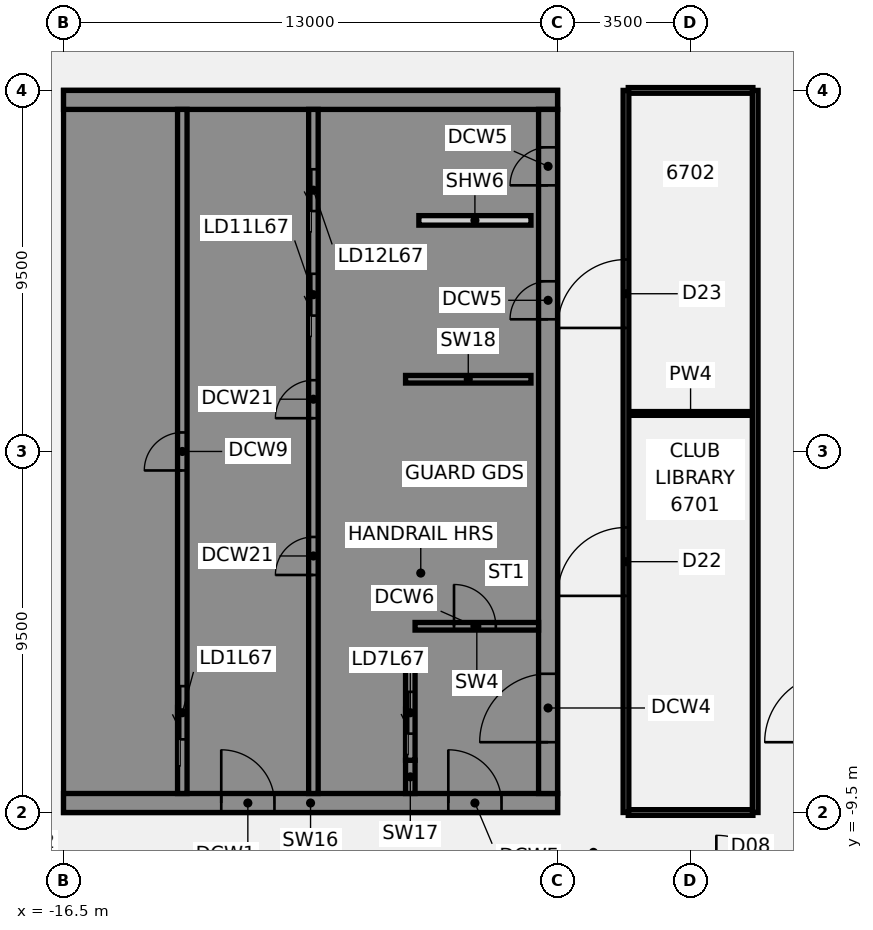
"""IFC4 building model, lengths in metres.
Left out: names, types, materials, properties, quantities, classifications, styles, units other than length and angle.
Written with IfcOpenShell. Run it as: python <this file> out.ifc"""

import sys

from ifc_helpers import new_model, si_unit, direction, frame, frame_2d, origin, place, context, subcontext, project, spatial, polyline, rectangle, outline, extrude, element, fill, save


model = new_model("IFC4")
c1 = context("Model", 3, precision=1e-05, world=origin(), true_north=direction((0.0, 1.0)))
c2 = subcontext(c1, "Body", "Model", "MODEL_VIEW")
j1 = project(units=[si_unit("LENGTHUNIT", "METRE"), si_unit("PLANEANGLEUNIT", "RADIAN")], contexts=[c1])
p1 = place(None, origin())
s1 = spatial("IfcSite", under=j1, at=p1, CompositionType="ELEMENT")
p2 = place(p1, origin())
s2 = spatial("IfcBuilding", under=s1, at=p2, CompositionType="ELEMENT")
p3 = place(p2, frame((0.0, 0.0, 264.0)))
s3 = spatial("IfcBuildingStorey", under=s2, at=p3, CompositionType="ELEMENT", Elevation=264.0)
p4 = place(p3, frame((-1.64, -9.5, 0.0), z_axis=(0.0, 0.0, 1.0), x_axis=(1.0, 0.0, 0.0)))
e1 = element("IfcWall", 1, at=p4, inside=s3, PredefinedType="PARTITIONING", context=c2, shape_type="SweptSolid", body=[
    extrude(rectangle(XDim=3.28, YDim=0.15, at=frame_2d((1.64, 0.0))), origin(), (0.0, 0.0, 1.0), 2.864),
])
p5 = place(p3, frame((-1.64, 1.0, 0.0), z_axis=(0.0, 0.0, 1.0), x_axis=(1.0, 0.0, 0.0)))
e2 = element("IfcWall", 2, at=p5, inside=s3, PredefinedType="PARTITIONING", context=c2, shape_type="SweptSolid", body=[
    extrude(rectangle(XDim=3.28, YDim=0.1, at=frame_2d((1.64, 0.0))), origin(), (0.0, 0.0, 1.0), 2.864),
])
p6 = place(p3, frame((-1.64, 9.5, 0.0), z_axis=(0.0, 0.0, 1.0), x_axis=(1.0, 0.0, 0.0)))
e3 = element("IfcWall", 3, at=p6, inside=s3, PredefinedType="PARTITIONING", context=c2, shape_type="SweptSolid", body=[
    extrude(rectangle(XDim=3.28, YDim=0.15, at=frame_2d((1.64, 0.0))), origin(), (0.0, 0.0, 1.0), 2.864),
])
p7 = place(p3, frame((-1.7, -9.5, 0.0), z_axis=(0.0, 0.0, 1.0), x_axis=(0.0, 1.0, 0.0)))
e4 = element("IfcWall", 4, at=p7, inside=s3, PredefinedType="PARTITIONING", context=c2, shape_type="SweptSolid", body=[
    extrude(rectangle(XDim=19.0, YDim=0.15, at=frame_2d((9.5, 0.0))), origin(), (0.0, 0.0, 1.0), 2.864),
])
p8 = place(p7, frame((5.7, 0.0, 0.0)))
e5 = element("IfcOpeningElement", 5, at=p8, cuts=e4, PredefinedType="OPENING", context=c2, shape_type="SweptSolid", body=[
    extrude(rectangle(XDim=1.8, YDim=2.1, at=frame_2d((0.9, 1.05))), frame((0.0, 0.085, 0.0), z_axis=(0.0, -1.0, 0.0), x_axis=(1.0, 0.0, 0.0)), (0.0, 0.0, 1.0), 0.17),
])
p9 = place(p7, frame((12.75, 0.0, 0.0)))
e6 = element("IfcOpeningElement", 6, at=p9, cuts=e4, PredefinedType="OPENING", context=c2, shape_type="SweptSolid", body=[
    extrude(rectangle(XDim=1.8, YDim=2.1, at=frame_2d((0.9, 1.05))), frame((0.0, 0.085, 0.0), z_axis=(0.0, -1.0, 0.0), x_axis=(1.0, 0.0, 0.0)), (0.0, 0.0, 1.0), 0.17),
])
p10 = place(p3, frame((1.7, -9.5, 0.0), z_axis=(0.0, 0.0, 1.0), x_axis=(0.0, 1.0, 0.0)))
e7 = element("IfcWall", 7, at=p10, inside=s3, PredefinedType="PARTITIONING", context=c2, shape_type="SweptSolid", body=[
    extrude(rectangle(XDim=19.0, YDim=0.15, at=frame_2d((9.5, 0.0))), origin(), (0.0, 0.0, 1.0), 2.864),
])
p11 = place(p3, frame((-16.5, -9.25, 0.0), z_axis=(0.0, 0.0, 1.0), x_axis=(1.0, 0.0, 0.0)))
e8 = element("IfcWall", 8, at=p11, inside=s3, PredefinedType="SHEAR", context=c2, shape_type="SweptSolid", body=[
    extrude(rectangle(XDim=13.0, YDim=0.5, at=frame_2d((6.5, 0.0))), origin(), (0.0, 0.0, 1.0), 3.46),
])
p12 = place(p11, frame((4.15, 0.0, 0.0)))
e9 = element("IfcOpeningElement", 9, at=p12, cuts=e8, PredefinedType="OPENING", context=c2, shape_type="SweptSolid", body=[
    extrude(rectangle(XDim=1.4, YDim=2.1, at=frame_2d((0.7, 1.05))), frame((0.0, 0.26, 0.0), z_axis=(0.0, -1.0, 0.0), x_axis=(1.0, 0.0, 0.0)), (0.0, 0.0, 1.0), 0.52),
])
p13 = place(p11, frame((10.125, 0.0, 0.0)))
e10 = element("IfcOpeningElement", 10, at=p13, cuts=e8, PredefinedType="OPENING", context=c2, shape_type="SweptSolid", body=[
    extrude(rectangle(XDim=1.4, YDim=2.1, at=frame_2d((0.7, 1.05))), frame((0.0, 0.26, 0.0), z_axis=(0.0, -1.0, 0.0), x_axis=(1.0, 0.0, 0.0)), (0.0, 0.0, 1.0), 0.52),
])
p14 = place(p3, origin())
e11 = element("IfcWall", 11, at=p14, inside=s3, PredefinedType="SHEAR", context=c2, shape_type="SweptSolid", body=[
    extrude(outline(polyline([(-13.5, -8.125), (-16.0, -8.125), (-16.0, -5.625), (-13.5, -5.625), (-13.5, -5.375), (-16.0, -5.375), (-16.0, 5.375), (-13.5, 5.375), (-13.5, 5.625), (-16.0, 5.625), (-16.0, 8.125), (-13.5, 8.125), (-13.5, 9.0), (-16.0, 9.0), (-16.5, 9.0), (-16.5, -9.0), (-16.0, -9.0), (-13.5, -9.0), (-13.5, -8.125)])), origin(), (0.0, 0.0, 1.0), 3.46),
])
p15 = place(p3, frame((-16.5, 9.25, 0.0), z_axis=(0.0, 0.0, 1.0), x_axis=(1.0, 0.0, 0.0)))
e12 = element("IfcWall", 12, at=p15, inside=s3, PredefinedType="SHEAR", context=c2, shape_type="SweptSolid", body=[
    extrude(rectangle(XDim=13.0, YDim=0.5, at=frame_2d((6.5, 0.0))), origin(), (0.0, 0.0, 1.0), 3.46),
])
p16 = place(p3, origin())
e13 = element("IfcWall", 13, at=p16, inside=s3, PredefinedType="SHEAR", context=c2, shape_type="SweptSolid", body=[
    extrude(outline(polyline([(-9.8, -5.375), (-9.8, -5.625), (-7.5, -5.625), (-7.25, -5.625), (-7.25, 9.0), (-7.5, 9.0), (-9.8, 9.0), (-9.8, 8.125), (-7.5, 8.125), (-7.5, 5.625), (-9.8, 5.625), (-9.8, 5.375), (-7.5, 5.375), (-7.5, 2.875), (-9.8, 2.875), (-9.8, 2.625), (-7.5, 2.625), (-7.5, -5.375), (-9.8, -5.375)])), origin(), (0.0, 0.0, 1.0), 3.46),
])
p17 = place(p3, origin())
e14 = element("IfcWall", 14, at=p17, inside=s3, PredefinedType="SHEAR", context=c2, shape_type="SweptSolid", body=[
    extrude(outline(polyline([(-7.5, -8.125), (-9.55, -8.125), (-9.55, -5.625), (-9.8, -5.625), (-9.8, -8.125), (-9.8, -9.0), (-7.5, -9.0), (-7.5, -8.125)])), origin(), (0.0, 0.0, 1.0), 3.46),
])
p18 = place(p3, frame((-7.375, -9.0, 0.0), z_axis=(0.0, 0.0, 1.0), x_axis=(0.0, 1.0, 0.0)))
e15 = element("IfcWall", 15, at=p18, inside=s3, PredefinedType="SHEAR", context=c2, shape_type="SweptSolid", body=[
    extrude(rectangle(XDim=0.875, YDim=0.25, at=frame_2d((0.438, 0.0))), origin(), (0.0, 0.0, 1.0), 3.46),
])
p19 = place(p3, frame((-7.5, 1.9, 0.0), z_axis=(0.0, 0.0, 1.0), x_axis=(1.0, 0.0, 0.0)))
e16 = element("IfcWall", 16, at=p19, inside=s3, PredefinedType="SHEAR", context=c2, shape_type="SweptSolid", body=[
    extrude(rectangle(XDim=3.3, YDim=0.2, at=frame_2d((1.65, 0.0))), origin(), (0.0, 0.0, 1.0), 3.46),
])
p20 = place(p3, frame((-13.375, -9.0, 0.0), z_axis=(0.0, 0.0, 1.0), x_axis=(0.0, 1.0, 0.0)))
e17 = element("IfcWall", 17, at=p20, inside=s3, PredefinedType="SHEAR", context=c2, shape_type="SweptSolid", body=[
    extrude(rectangle(XDim=18.0, YDim=0.25, at=frame_2d((9.0, 0.0))), origin(), (0.0, 0.0, 1.0), 3.46),
])
p21 = place(p20, frame((1.425, 0.0, 0.0)))
e18 = element("IfcOpeningElement", 18, at=p21, cuts=e17, PredefinedType="OPENING", context=c2, shape_type="SweptSolid", body=[
    extrude(rectangle(XDim=1.4, YDim=2.1, at=frame_2d((0.7, 1.05))), frame((0.0, 0.135, 0.0), z_axis=(0.0, -1.0, 0.0), x_axis=(1.0, 0.0, 0.0)), (0.0, 0.0, 1.0), 0.27),
])
p22 = place(p20, frame((8.5, 0.0, 0.0)))
e19 = element("IfcOpeningElement", 19, at=p22, cuts=e17, PredefinedType="OPENING", context=c2, shape_type="SweptSolid", body=[
    extrude(rectangle(XDim=1.0, YDim=2.1, at=frame_2d((0.5, 1.05))), frame((0.0, 0.135, 0.0), z_axis=(0.0, -1.0, 0.0), x_axis=(1.0, 0.0, 0.0)), (0.0, 0.0, 1.0), 0.27),
])
p23 = place(p3, frame((-9.925, -9.0, 0.0), z_axis=(0.0, 0.0, 1.0), x_axis=(0.0, 1.0, 0.0)))
e20 = element("IfcWall", 20, at=p23, inside=s3, PredefinedType="SHEAR", context=c2, shape_type="SweptSolid", body=[
    extrude(rectangle(XDim=18.0, YDim=0.25, at=frame_2d((9.0, 0.0))), origin(), (0.0, 0.0, 1.0), 3.46),
])
p24 = place(p23, frame((12.575, 0.0, 0.0)))
e21 = element("IfcOpeningElement", 21, at=p24, cuts=e20, PredefinedType="OPENING", context=c2, shape_type="SweptSolid", body=[
    extrude(rectangle(XDim=1.1, YDim=2.1, at=frame_2d((0.55, 1.05))), frame((0.0, 0.135, 0.0), z_axis=(0.0, -1.0, 0.0), x_axis=(1.0, 0.0, 0.0)), (0.0, 0.0, 1.0), 0.27),
])
p25 = place(p23, frame((15.325, 0.0, 0.0)))
e22 = element("IfcOpeningElement", 22, at=p25, cuts=e20, PredefinedType="OPENING", context=c2, shape_type="SweptSolid", body=[
    extrude(rectangle(XDim=1.1, YDim=2.1, at=frame_2d((0.55, 1.05))), frame((0.0, 0.135, 0.0), z_axis=(0.0, -1.0, 0.0), x_axis=(1.0, 0.0, 0.0)), (0.0, 0.0, 1.0), 0.27),
])
p26 = place(p23, frame((5.75, 0.0, 0.0)))
e23 = element("IfcOpeningElement", 23, at=p26, cuts=e20, PredefinedType="OPENING", context=c2, shape_type="SweptSolid", body=[
    extrude(rectangle(XDim=1.0, YDim=2.1, at=frame_2d((0.5, 1.05))), frame((0.0, 0.135, 0.0), z_axis=(0.0, -1.0, 0.0), x_axis=(1.0, 0.0, 0.0)), (0.0, 0.0, 1.0), 0.27),
])
p27 = place(p23, frame((9.875, 0.0, 0.0)))
e24 = element("IfcOpeningElement", 24, at=p27, cuts=e20, PredefinedType="OPENING", context=c2, shape_type="SweptSolid", body=[
    extrude(rectangle(XDim=1.0, YDim=2.1, at=frame_2d((0.5, 1.05))), frame((0.0, 0.135, 0.0), z_axis=(0.0, -1.0, 0.0), x_axis=(1.0, 0.0, 0.0)), (0.0, 0.0, 1.0), 0.27),
])
p28 = place(p3, frame((-7.375, -8.125, 0.0), z_axis=(0.0, 0.0, 1.0), x_axis=(0.0, 1.0, 0.0)))
e25 = element("IfcWall", 25, at=p28, inside=s3, PredefinedType="SHEAR", context=c2, shape_type="SweptSolid", body=[
    extrude(rectangle(XDim=2.5, YDim=0.25, at=frame_2d((1.25, 0.0))), origin(), (0.0, 0.0, 1.0), 3.46),
])
p29 = place(p28, frame((0.7, 0.0, 0.0)))
e26 = element("IfcOpeningElement", 26, at=p29, cuts=e25, PredefinedType="OPENING", context=c2, shape_type="SweptSolid", body=[
    extrude(rectangle(XDim=1.1, YDim=2.1, at=frame_2d((0.55, 1.05))), frame((0.0, 0.135, 0.0), z_axis=(0.0, -1.0, 0.0), x_axis=(1.0, 0.0, 0.0)), (0.0, 0.0, 1.0), 0.27),
])
p30 = place(p3, frame((-3.75, -9.0, 0.0), z_axis=(0.0, 0.0, 1.0), x_axis=(0.0, 1.0, 0.0)))
e27 = element("IfcWall", 27, at=p30, inside=s3, PredefinedType="SHEAR", context=c2, shape_type="SweptSolid", body=[
    extrude(rectangle(XDim=18.0, YDim=0.5, at=frame_2d((9.0, 0.0))), origin(), (0.0, 0.0, 1.0), 3.46),
])
p31 = place(p30, frame((1.35, 0.0, 0.0)))
e28 = element("IfcOpeningElement", 28, at=p31, cuts=e27, PredefinedType="OPENING", context=c2, shape_type="SweptSolid", body=[
    extrude(rectangle(XDim=1.8, YDim=2.1, at=frame_2d((0.9, 1.05))), frame((0.0, 0.26, 0.0), z_axis=(0.0, -1.0, 0.0), x_axis=(1.0, 0.0, 0.0)), (0.0, 0.0, 1.0), 0.52),
])
p32 = place(p30, frame((12.478, 0.0, 0.0)))
e29 = element("IfcOpeningElement", 29, at=p32, cuts=e27, PredefinedType="OPENING", context=c2, shape_type="SweptSolid", body=[
    extrude(rectangle(XDim=1.0, YDim=2.1, at=frame_2d((0.5, 1.05))), frame((0.0, 0.26, 0.0), z_axis=(0.0, -1.0, 0.0), x_axis=(1.0, 0.0, 0.0)), (0.0, 0.0, 1.0), 0.52),
])
p33 = place(p30, frame((16.002, 0.0, 0.0)))
e30 = element("IfcOpeningElement", 30, at=p33, cuts=e27, PredefinedType="OPENING", context=c2, shape_type="SweptSolid", body=[
    extrude(rectangle(XDim=1.0, YDim=2.1, at=frame_2d((0.5, 1.05))), frame((0.0, 0.26, 0.0), z_axis=(0.0, -1.0, 0.0), x_axis=(1.0, 0.0, 0.0)), (0.0, 0.0, 1.0), 0.52),
])
p34 = place(p3, frame((-7.15, 6.08, 0.0), z_axis=(0.0, 0.0, 1.0), x_axis=(1.0, 0.0, 0.0)))
e31 = element("IfcWall", 31, at=p34, inside=s3, PredefinedType="PARTITIONING", context=c2, shape_type="SweptSolid", body=[
    extrude(rectangle(XDim=2.95, YDim=0.25, at=frame_2d((1.475, 0.0))), origin(), (0.0, 0.0, 1.0), 3.46),
])
p35 = place(p3, frame((-7.25, -4.6, 0.0), z_axis=(0.0, 0.0, 1.0), x_axis=(1.0, 0.0, 0.0)))
e32 = element("IfcWall", 32, at=p35, inside=s3, PredefinedType="SHEAR", context=c2, shape_type="SweptSolid", body=[
    extrude(rectangle(XDim=3.25, YDim=0.2, at=frame_2d((1.625, 0.0))), origin(), (0.0, 0.0, 1.0), 3.46),
])
p36 = place(p35, frame((1.025, 0.0, 0.0)))
e33 = element("IfcOpeningElement", 33, at=p36, cuts=e32, PredefinedType="OPENING", context=c2, shape_type="SweptSolid", body=[
    extrude(rectangle(XDim=1.1, YDim=2.1, at=frame_2d((0.55, 1.05))), frame((0.0, 0.11, 0.0), z_axis=(0.0, -1.0, 0.0), x_axis=(1.0, 0.0, 0.0)), (0.0, 0.0, 1.0), 0.22),
])
p37 = place(p8, frame((1.8, 0.0, 0.0), z_axis=(0.0, 0.0, 1.0), x_axis=(-1.0, 0.0, 0.0)))
e34 = element("IfcDoor", 34, at=p37, inside=s3, OperationType="DOUBLE_DOOR_SINGLE_SWING", PredefinedType="DOOR", context=c2, shape_type="SweptSolid", body=[
    extrude(rectangle(XDim=1.8, YDim=2.1, at=frame_2d((0.9, 1.05))), frame((0.0, 0.025, 0.0), z_axis=(0.0, -1.0, 0.0), x_axis=(1.0, 0.0, 0.0)), (0.0, 0.0, 1.0), 0.05),
])
fill(e5, e34)
p38 = place(p9, frame((1.8, 0.0, 0.0), z_axis=(0.0, 0.0, 1.0), x_axis=(-1.0, 0.0, 0.0)))
e35 = element("IfcDoor", 35, at=p38, inside=s3, OperationType="DOUBLE_DOOR_SINGLE_SWING", PredefinedType="DOOR", context=c2, shape_type="SweptSolid", body=[
    extrude(rectangle(XDim=1.8, YDim=2.1, at=frame_2d((0.9, 1.05))), frame((0.0, 0.025, 0.0), z_axis=(0.0, -1.0, 0.0), x_axis=(1.0, 0.0, 0.0)), (0.0, 0.0, 1.0), 0.05),
])
fill(e6, e35)
p39 = place(p12, origin())
e36 = element("IfcDoor", 36, at=p39, inside=s3, OperationType="SINGLE_SWING_LEFT", PredefinedType="DOOR", context=c2, shape_type="SweptSolid", body=[
    extrude(rectangle(XDim=1.4, YDim=2.1, at=frame_2d((0.7, 1.05))), frame((0.0, 0.025, 0.0), z_axis=(0.0, -1.0, 0.0), x_axis=(1.0, 0.0, 0.0)), (0.0, 0.0, 1.0), 0.05),
])
fill(e9, e36)
p40 = place(p13, origin())
e37 = element("IfcDoor", 37, at=p40, inside=s3, OperationType="SINGLE_SWING_LEFT", PredefinedType="DOOR", context=c2, shape_type="SweptSolid", body=[
    extrude(rectangle(XDim=1.4, YDim=2.1, at=frame_2d((0.7, 1.05))), frame((0.0, 0.025, 0.0), z_axis=(0.0, -1.0, 0.0), x_axis=(1.0, 0.0, 0.0)), (0.0, 0.0, 1.0), 0.05),
])
fill(e10, e37)
p41 = place(p31, origin())
e38 = element("IfcDoor", 38, at=p41, inside=s3, OperationType="SINGLE_SWING_LEFT", PredefinedType="DOOR", context=c2, shape_type="SweptSolid", body=[
    extrude(rectangle(XDim=1.8, YDim=2.1, at=frame_2d((0.9, 1.05))), frame((0.0, 0.025, 0.0), z_axis=(0.0, -1.0, 0.0), x_axis=(1.0, 0.0, 0.0)), (0.0, 0.0, 1.0), 0.05),
])
fill(e28, e38)
p42 = place(p32, origin())
e39 = element("IfcDoor", 39, at=p42, inside=s3, OperationType="SINGLE_SWING_LEFT", PredefinedType="DOOR", context=c2, shape_type="SweptSolid", body=[
    extrude(rectangle(XDim=1.0, YDim=2.1, at=frame_2d((0.5, 1.05))), frame((0.0, 0.225, 0.0), z_axis=(0.0, -1.0, 0.0), x_axis=(1.0, 0.0, 0.0)), (0.0, 0.0, 1.0), 0.05),
])
fill(e29, e39)
p43 = place(p33, origin())
e40 = element("IfcDoor", 40, at=p43, inside=s3, OperationType="SINGLE_SWING_LEFT", PredefinedType="DOOR", context=c2, shape_type="SweptSolid", body=[
    extrude(rectangle(XDim=1.0, YDim=2.1, at=frame_2d((0.5, 1.05))), frame((0.0, 0.225, 0.0), z_axis=(0.0, -1.0, 0.0), x_axis=(1.0, 0.0, 0.0)), (0.0, 0.0, 1.0), 0.05),
])
fill(e30, e40)
p44 = place(p36, origin())
e41 = element("IfcDoor", 41, at=p44, inside=s3, OperationType="SINGLE_SWING_LEFT", PredefinedType="DOOR", context=c2, shape_type="SweptSolid", body=[
    extrude(rectangle(XDim=1.1, YDim=2.1, at=frame_2d((0.55, 1.05))), frame((0.0, 0.025, 0.0), z_axis=(0.0, -1.0, 0.0), x_axis=(1.0, 0.0, 0.0)), (0.0, 0.0, 1.0), 0.05),
])
fill(e33, e41)
p45 = place(p21, origin())
e42 = element("IfcDoor", 42, at=p45, inside=s3, OperationType="SLIDING_TO_LEFT", PredefinedType="DOOR", context=c2, shape_type="SweptSolid", body=[
    extrude(rectangle(XDim=1.4, YDim=2.1, at=frame_2d((0.7, 1.05))), frame((0.0, 0.025, 0.0), z_axis=(0.0, -1.0, 0.0), x_axis=(1.0, 0.0, 0.0)), (0.0, 0.0, 1.0), 0.05),
])
fill(e18, e42)
p46 = place(p29, origin())
e43 = element("IfcDoor", 43, at=p46, inside=s3, OperationType="SLIDING_TO_LEFT", PredefinedType="DOOR", context=c2, shape_type="SweptSolid", body=[
    extrude(rectangle(XDim=1.1, YDim=2.1, at=frame_2d((0.55, 1.05))), frame((0.0, 0.025, 0.0), z_axis=(0.0, -1.0, 0.0), x_axis=(1.0, 0.0, 0.0)), (0.0, 0.0, 1.0), 0.05),
])
fill(e26, e43)
p47 = place(p24, origin())
e44 = element("IfcDoor", 44, at=p47, inside=s3, OperationType="SLIDING_TO_LEFT", PredefinedType="DOOR", context=c2, shape_type="SweptSolid", body=[
    extrude(rectangle(XDim=1.1, YDim=2.1, at=frame_2d((0.55, 1.05))), frame((0.0, 0.025, 0.0), z_axis=(0.0, -1.0, 0.0), x_axis=(1.0, 0.0, 0.0)), (0.0, 0.0, 1.0), 0.05),
])
fill(e21, e44)
p48 = place(p25, origin())
e45 = element("IfcDoor", 45, at=p48, inside=s3, OperationType="SLIDING_TO_LEFT", PredefinedType="DOOR", context=c2, shape_type="SweptSolid", body=[
    extrude(rectangle(XDim=1.1, YDim=2.1, at=frame_2d((0.55, 1.05))), frame((0.0, 0.025, 0.0), z_axis=(0.0, -1.0, 0.0), x_axis=(1.0, 0.0, 0.0)), (0.0, 0.0, 1.0), 0.05),
])
fill(e22, e45)
p49 = place(p22, origin())
e46 = element("IfcDoor", 46, at=p49, inside=s3, OperationType="SINGLE_SWING_LEFT", PredefinedType="DOOR", context=c2, shape_type="SweptSolid", body=[
    extrude(rectangle(XDim=1.0, YDim=2.1, at=frame_2d((0.5, 1.05))), frame((0.0, 0.025, 0.0), z_axis=(0.0, -1.0, 0.0), x_axis=(1.0, 0.0, 0.0)), (0.0, 0.0, 1.0), 0.05),
])
fill(e19, e46)
p50 = place(p26, origin())
e47 = element("IfcDoor", 47, at=p50, inside=s3, OperationType="SINGLE_SWING_LEFT", PredefinedType="DOOR", context=c2, shape_type="SweptSolid", body=[
    extrude(rectangle(XDim=1.0, YDim=2.1, at=frame_2d((0.5, 1.05))), frame((0.0, 0.025, 0.0), z_axis=(0.0, -1.0, 0.0), x_axis=(1.0, 0.0, 0.0)), (0.0, 0.0, 1.0), 0.05),
])
fill(e23, e47)
p51 = place(p27, origin())
e48 = element("IfcDoor", 48, at=p51, inside=s3, OperationType="SINGLE_SWING_LEFT", PredefinedType="DOOR", context=c2, shape_type="SweptSolid", body=[
    extrude(rectangle(XDim=1.0, YDim=2.1, at=frame_2d((0.5, 1.05))), frame((0.0, 0.025, 0.0), z_axis=(0.0, -1.0, 0.0), x_axis=(1.0, 0.0, 0.0)), (0.0, 0.0, 1.0), 0.05),
])
fill(e24, e48)
save(model, sys.argv[1])
